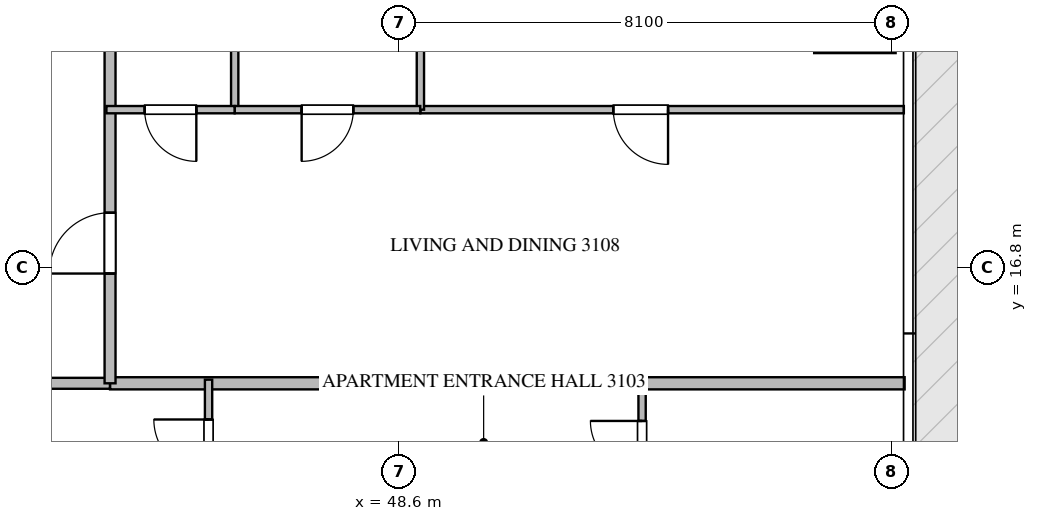
"""IFC4 building model, lengths in metres.
Left out: names, types, materials, properties, quantities, classifications, styles, units other than length and angle.
Written with IfcOpenShell. Run it as: python <this file> out.ifc"""

import sys

from ifc_helpers import new_model, si_unit, direction, frame, frame_2d, origin, place, context, subcontext, project, spatial, rectangle, extrude, source, transform, mapped, element, fill, save


model = new_model("IFC4")
c1 = context("Model", 3, precision=1e-05, world=origin(), true_north=direction((0.0, 1.0)))
c2 = subcontext(c1, "Body", "Model", "MODEL_VIEW")
j1 = project(units=[si_unit("LENGTHUNIT", "METRE"), si_unit("PLANEANGLEUNIT", "RADIAN")], contexts=[c1])
p1 = place(None, origin())
s1 = spatial("IfcSite", under=j1, at=p1, CompositionType="ELEMENT")
p2 = place(p1, origin())
s2 = spatial("IfcBuilding", under=s1, at=p2, CompositionType="ELEMENT")
p3 = place(p2, frame((0.0, 0.0, 127.65)))
s3 = spatial("IfcBuildingStorey", under=s2, at=p3, CompositionType="ELEMENT", Elevation=127.65)
p4 = place(p3, frame((43.85, 14.9, 0.0), z_axis=(0.0, 0.0, 1.0), x_axis=(1.0, 0.0, 0.0)))
e1 = element("IfcWall", 1, at=p4, inside=s3, PredefinedType="PARTITIONING", context=c2, shape_type="SweptSolid", body=[
    extrude(rectangle(XDim=13.068, YDim=0.2, at=frame_2d((6.534, 0.0))), origin(), (0.0, 0.0, 1.0), 3.49),
])
p5 = place(p3, frame((20.952, 14.9, 0.0), z_axis=(0.0, 0.0, 1.0), x_axis=(1.0, 0.0, 0.0)))
e2 = element("IfcWall", 2, at=p5, inside=s3, PredefinedType="PARTITIONING", context=c2, shape_type="SweptSolid", body=[
    extrude(rectangle(XDim=22.896, YDim=0.18, at=frame_2d((11.448, 0.0))), origin(), (0.0, 0.0, 1.0), 3.49),
])
p6 = place(p5, frame((2.781, 0.0, 0.0)))
e3 = element("IfcOpeningElement", 3, at=p6, cuts=e2, PredefinedType="OPENING", context=c2, shape_type="SweptSolid", body=[
    extrude(rectangle(XDim=1.0, YDim=2.15, at=frame_2d((0.5, 1.075))), frame((0.0, 0.1, 0.0), z_axis=(0.0, -1.0, 0.0), x_axis=(1.0, 0.0, 0.0)), (0.0, 0.0, 1.0), 0.2),
])
p7 = place(p5, frame((7.16, 0.0, 0.0)))
e4 = element("IfcOpeningElement", 4, at=p7, cuts=e2, PredefinedType="OPENING", context=c2, shape_type="SweptSolid", body=[
    extrude(rectangle(XDim=1.0, YDim=2.15, at=frame_2d((0.5, 1.075))), frame((0.0, 0.1, 0.0), z_axis=(0.0, -1.0, 0.0), x_axis=(1.0, 0.0, 0.0)), (0.0, 0.0, 1.0), 0.2),
])
p8 = place(p5, frame((19.115, 0.0, 0.0)))
e5 = element("IfcOpeningElement", 5, at=p8, cuts=e2, PredefinedType="OPENING", context=c2, shape_type="SweptSolid", body=[
    extrude(rectangle(XDim=1.0, YDim=2.15, at=frame_2d((0.5, 1.075))), frame((0.0, 0.1, 0.0), z_axis=(0.0, -1.0, 0.0), x_axis=(1.0, 0.0, 0.0)), (0.0, 0.0, 1.0), 0.2),
])
p9 = place(p3, frame((43.85, 14.9, 0.0), z_axis=(0.0, 0.0, 1.0), x_axis=(0.0, 1.0, 0.0)))
e6 = element("IfcWall", 6, at=p9, inside=s3, PredefinedType="PARTITIONING", context=c2, shape_type="SweptSolid", body=[
    extrude(rectangle(XDim=18.7, YDim=0.18, at=frame_2d((9.35, 0.0))), origin(), (0.0, 0.0, 1.0), 3.49),
])
p10 = place(p9, frame((1.805, 0.0, 0.0)))
e7 = element("IfcOpeningElement", 7, at=p10, cuts=e6, PredefinedType="OPENING", context=c2, shape_type="SweptSolid", body=[
    extrude(rectangle(XDim=1.0, YDim=2.15, at=frame_2d((0.5, 1.075))), frame((0.0, 0.1, 0.0), z_axis=(0.0, -1.0, 0.0), x_axis=(1.0, 0.0, 0.0)), (0.0, 0.0, 1.0), 0.2),
])
p11 = place(p9, frame((10.602, 0.0, 0.0)))
e8 = element("IfcOpeningElement", 8, at=p11, cuts=e6, PredefinedType="OPENING", context=c2, shape_type="SweptSolid", body=[
    extrude(rectangle(XDim=1.0, YDim=2.15, at=frame_2d((0.5, 1.075))), frame((0.0, 0.1, 0.0), z_axis=(0.0, -1.0, 0.0), x_axis=(1.0, 0.0, 0.0)), (0.0, 0.0, 1.0), 0.2),
])
p12 = place(p3, frame((45.47, 12.75, 0.0), z_axis=(0.0, 0.0, 1.0), x_axis=(0.0, 1.0, 0.0)))
e9 = element("IfcWall", 9, at=p12, inside=s3, PredefinedType="PARTITIONING", context=c2, shape_type="SweptSolid", body=[
    extrude(rectangle(XDim=2.21, YDim=0.12, at=frame_2d((1.105, 0.0))), origin(), (0.0, 0.0, 1.0), 3.49),
])
p13 = place(p12, frame((0.655, 0.0, 0.0)))
e10 = element("IfcOpeningElement", 10, at=p13, cuts=e9, PredefinedType="OPENING", context=c2, shape_type="SweptSolid", body=[
    extrude(rectangle(XDim=0.9, YDim=2.1, at=frame_2d((0.45, 1.05))), frame((0.0, 0.07, 0.0), z_axis=(0.0, -1.0, 0.0), x_axis=(1.0, 0.0, 0.0)), (0.0, 0.0, 1.0), 0.14),
])
p14 = place(p3, frame((52.6, 12.752, 0.0), z_axis=(0.0, 0.0, 1.0), x_axis=(0.0, 1.0, 0.0)))
e11 = element("IfcWall", 11, at=p14, inside=s3, PredefinedType="PARTITIONING", context=c2, shape_type="SweptSolid", body=[
    extrude(rectangle(XDim=2.208, YDim=0.12, at=frame_2d((1.104, 0.0))), origin(), (0.0, 0.0, 1.0), 3.49),
])
p15 = place(p14, frame((0.679, 0.0, 0.0)))
e12 = element("IfcOpeningElement", 12, at=p15, cuts=e11, PredefinedType="OPENING", context=c2, shape_type="SweptSolid", body=[
    extrude(rectangle(XDim=0.85, YDim=2.1, at=frame_2d((0.425, 1.05))), frame((0.0, 0.07, 0.0), z_axis=(0.0, -1.0, 0.0), x_axis=(1.0, 0.0, 0.0)), (0.0, 0.0, 1.0), 0.14),
])
p16 = place(p3, frame((56.905, 19.4, 0.0), z_axis=(0.0, 0.0, 1.0), x_axis=(-1.0, 0.0, 0.0)))
e13 = element("IfcWall", 13, at=p16, inside=s3, PredefinedType="PARTITIONING", context=c2, shape_type="SweptSolid", body=[
    extrude(rectangle(XDim=7.951, YDim=0.12, at=frame_2d((3.976, 0.0))), origin(), (0.0, 0.0, 1.0), 3.49),
])
p17 = place(p16, frame((3.878, 0.0, 0.0)))
e14 = element("IfcOpeningElement", 14, at=p17, cuts=e13, PredefinedType="OPENING", context=c2, shape_type="SweptSolid", body=[
    extrude(rectangle(XDim=0.9, YDim=2.1, at=frame_2d((0.45, 1.05))), frame((0.0, 0.07, 0.0), z_axis=(0.0, -1.0, 0.0), x_axis=(1.0, 0.0, 0.0)), (0.0, 0.0, 1.0), 0.14),
])
for number, where, z_axis, x_axis in (
    (15, (48.954, 19.4, 0.0), (0.0, 0.0, 1.0), (0.0, 1.0, 0.0)),
    (16, (45.9, 19.4, 0.0), (0.0, 0.0, 1.0), (0.0, 1.0, 0.0)),
):
    element("IfcWall", number, at=place(p3, frame(where, z_axis=z_axis, x_axis=x_axis)), inside=s3, PredefinedType="PARTITIONING", context=c2, shape_type="SweptSolid", body=[
        extrude(rectangle(XDim=4.86, YDim=0.12, at=frame_2d((2.43, 0.0))), origin(), (0.0, 0.0, 1.0), 3.49),
    ])
p18 = place(p3, frame((48.952, 19.4, 0.0), z_axis=(0.0, 0.0, 1.0), x_axis=(-1.0, 0.0, 0.0)))
e17 = element("IfcWall", 17, at=p18, inside=s3, PredefinedType="PARTITIONING", context=c2, shape_type="SweptSolid", body=[
    extrude(rectangle(XDim=3.052, YDim=0.12, at=frame_2d((1.526, 0.0))), origin(), (0.0, 0.0, 1.0), 3.49),
])
p19 = place(p18, frame((1.101, 0.0, 0.0)))
e18 = element("IfcOpeningElement", 18, at=p19, cuts=e17, PredefinedType="OPENING", context=c2, shape_type="SweptSolid", body=[
    extrude(rectangle(XDim=0.85, YDim=2.1, at=frame_2d((0.425, 1.05))), frame((0.0, 0.07, 0.0), z_axis=(0.0, -1.0, 0.0), x_axis=(1.0, 0.0, 0.0)), (0.0, 0.0, 1.0), 0.14),
])
p20 = place(p3, frame((45.898, 19.4, 0.0), z_axis=(0.0, 0.0, 1.0), x_axis=(-1.0, 0.0, 0.0)))
e19 = element("IfcWall", 19, at=p20, inside=s3, PredefinedType="PARTITIONING", context=c2, shape_type="SweptSolid", body=[
    extrude(rectangle(XDim=2.108, YDim=0.12, at=frame_2d((1.054, 0.0))), origin(), (0.0, 0.0, 1.0), 3.49),
])
p21 = place(p20, frame((0.629, 0.0, 0.0)))
e20 = element("IfcOpeningElement", 20, at=p21, cuts=e19, PredefinedType="OPENING", context=c2, shape_type="SweptSolid", body=[
    extrude(rectangle(XDim=0.85, YDim=2.1, at=frame_2d((0.425, 1.05))), frame((0.0, 0.07, 0.0), z_axis=(0.0, -1.0, 0.0), x_axis=(1.0, 0.0, 0.0)), (0.0, 0.0, 1.0), 0.14),
])
m1 = source(origin(), c2, "Body", "SweptSolid", [
    extrude(rectangle(XDim=1.0, YDim=2.15, at=frame_2d((0.5, 1.075))), frame((0.0, 0.025, 0.0), z_axis=(0.0, -1.0, 0.0), x_axis=(1.0, 0.0, 0.0)), (0.0, 0.0, 1.0), 0.05),
])
p22 = place(p10, origin())
e21 = element("IfcDoor", 21, at=p22, inside=s3, OperationType="SINGLE_SWING_LEFT", PredefinedType="DOOR", context=c2, shape_type="MappedRepresentation", body=[
    mapped(m1, transform((0.0, 0.0, 0.0), scale=1.0)),
])
fill(e7, e21)
m2 = source(origin(), c2, "Body", "SweptSolid", [
    extrude(rectangle(XDim=0.9, YDim=2.1, at=frame_2d((0.45, 1.05))), frame((0.0, 0.025, 0.0), z_axis=(0.0, -1.0, 0.0), x_axis=(1.0, 0.0, 0.0)), (0.0, 0.0, 1.0), 0.05),
])
p23 = place(p13, origin())
e22 = element("IfcDoor", 22, at=p23, inside=s3, OperationType="SINGLE_SWING_RIGHT", PredefinedType="DOOR", context=c2, shape_type="MappedRepresentation", body=[
    mapped(m2, transform((0.0, 0.0, 0.0), scale=1.0)),
])
fill(e10, e22)
m3 = source(origin(), c2, "Body", "SweptSolid", [
    extrude(rectangle(XDim=0.85, YDim=2.1, at=frame_2d((0.425, 1.05))), frame((0.0, 0.025, 0.0), z_axis=(0.0, -1.0, 0.0), x_axis=(1.0, 0.0, 0.0)), (0.0, 0.0, 1.0), 0.05),
])
p24 = place(p15, origin())
e23 = element("IfcDoor", 23, at=p24, inside=s3, OperationType="SINGLE_SWING_RIGHT", PredefinedType="DOOR", context=c2, shape_type="MappedRepresentation", body=[
    mapped(m3, transform((0.0, 0.0, 0.0), scale=1.0)),
])
fill(e12, e23)
p25 = place(p17, origin())
e24 = element("IfcDoor", 24, at=p25, inside=s3, OperationType="SINGLE_SWING_LEFT", PredefinedType="DOOR", context=c2, shape_type="MappedRepresentation", body=[
    mapped(m2, transform((0.0, 0.0, 0.0), scale=1.0)),
])
fill(e14, e24)
p26 = place(p19, origin())
e25 = element("IfcDoor", 25, at=p26, inside=s3, OperationType="SINGLE_SWING_RIGHT", PredefinedType="DOOR", context=c2, shape_type="MappedRepresentation", body=[
    mapped(m3, transform((0.0, 0.0, 0.0), scale=1.0)),
])
fill(e18, e25)
p27 = place(p21, origin())
e26 = element("IfcDoor", 26, at=p27, inside=s3, OperationType="SINGLE_SWING_LEFT", PredefinedType="DOOR", context=c2, shape_type="MappedRepresentation", body=[
    mapped(m3, transform((0.0, 0.0, 0.0), scale=1.0)),
])
fill(e20, e26)
save(model, sys.argv[1])
